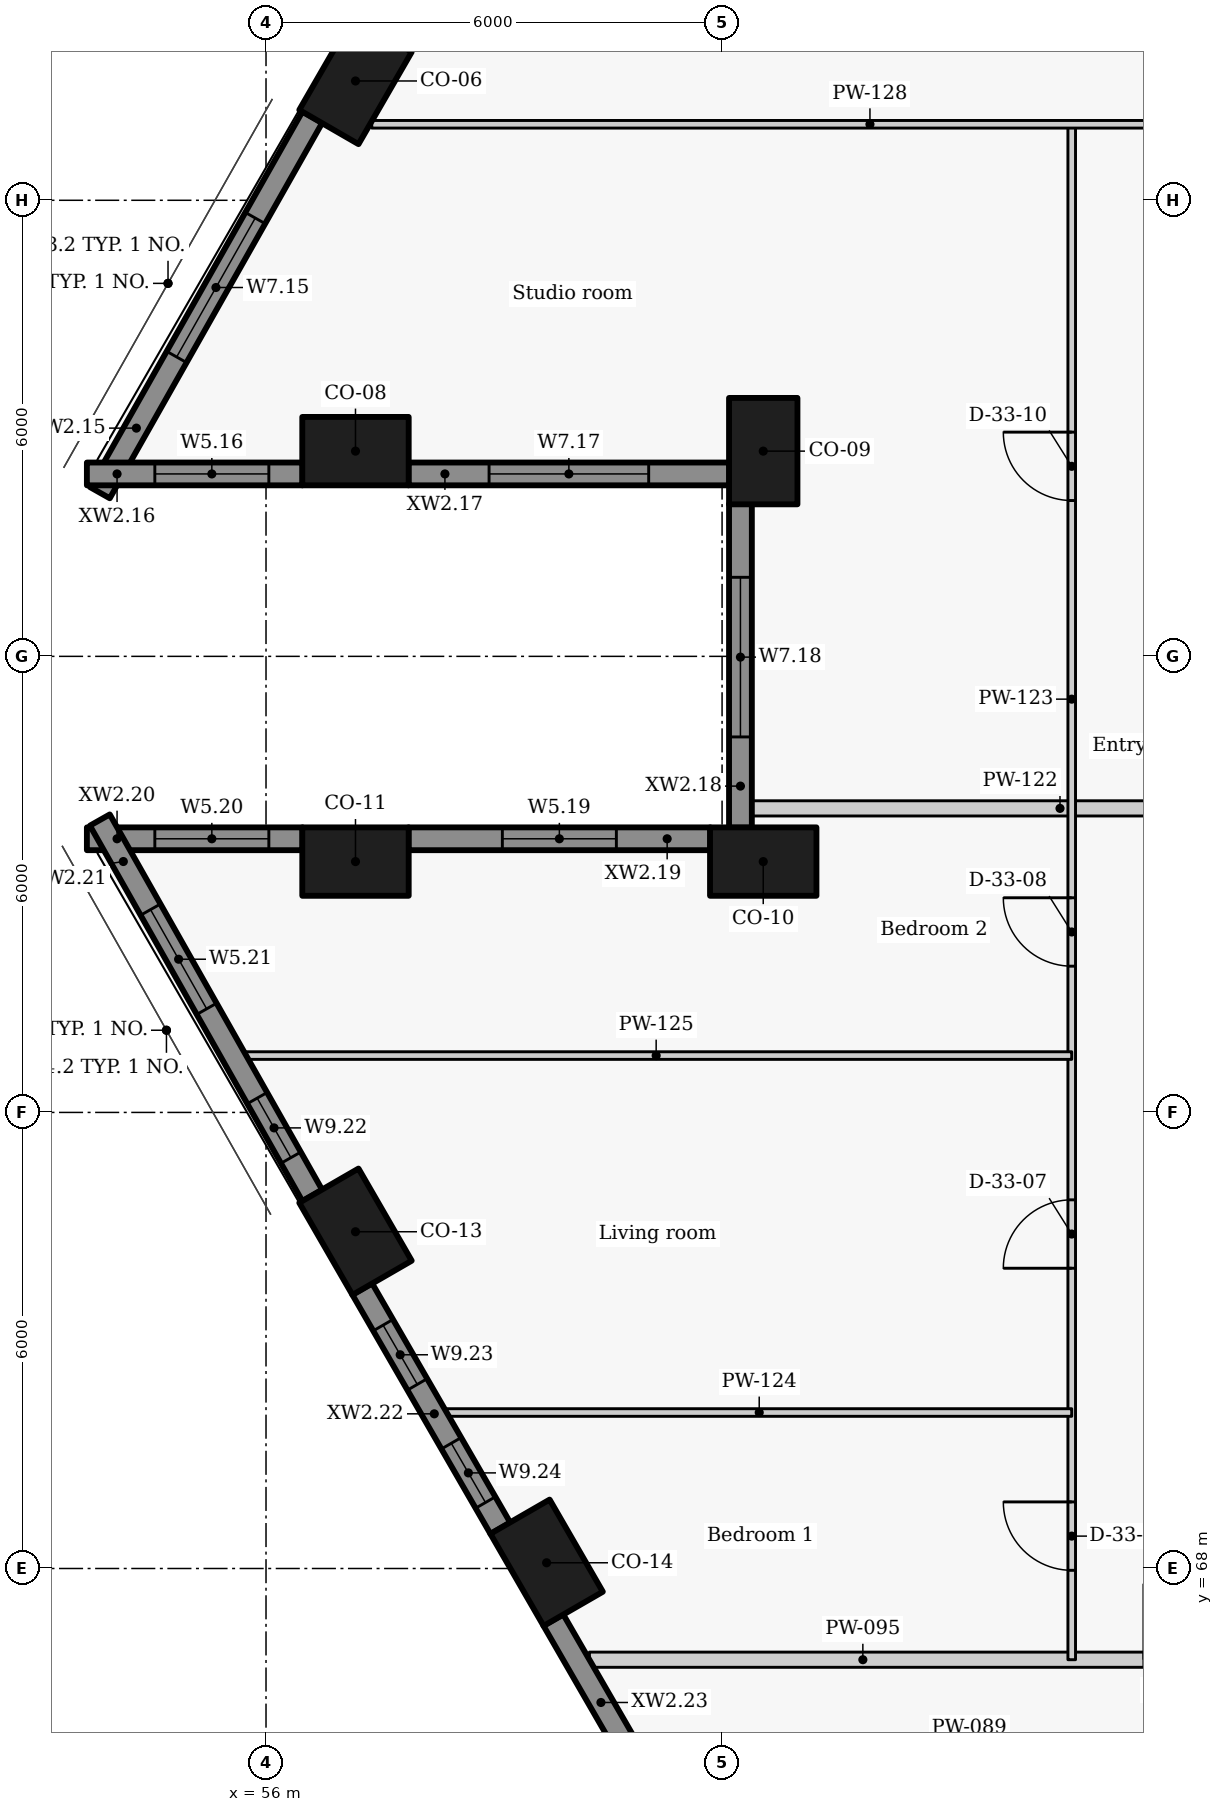
"""IFC4 building model, lengths in metres.
Left out: names, types, materials, properties, quantities, classifications, styles, units other than length and angle.
Written with IfcOpenShell. Run it as: python <this file> out.ifc"""

import sys

from ifc_helpers import new_model, si_unit, direction, frame, frame_2d, origin, origin_2d, place, context, subcontext, project, spatial, rectangle, extrude, element, fill, save


model = new_model("IFC4")
c1 = context("Model", 3, precision=1e-05, world=origin(), true_north=direction((0.0, 1.0)))
c2 = subcontext(c1, "Body", "Model", "MODEL_VIEW")
j1 = project(units=[si_unit("LENGTHUNIT", "METRE"), si_unit("PLANEANGLEUNIT", "RADIAN")], contexts=[c1])
p1 = place(None, origin())
s1 = spatial("IfcSite", under=j1, at=p1, CompositionType="ELEMENT")
p2 = place(p1, origin())
s2 = spatial("IfcBuilding", under=s1, at=p2, CompositionType="ELEMENT")
p3 = place(p2, frame((0.0, 0.0, 97.5)))
s3 = spatial("IfcBuildingStorey", under=s2, at=p3, CompositionType="ELEMENT", Elevation=97.5)
for number, where, z_axis, x_axis in (
    (1, (57.177, 87.57, 0.0), (0.0, 0.0, 1.0), (-0.5, -0.866, 0.0)),
    (2, (57.177, 82.7, 0.0), (0.0, 0.0, 1.0), (1.0, 0.0, 0.0)),
    (3, (62.542, 82.7, 0.0), (0.0, 0.0, 1.0), (0.0, -1.0, 0.0)),
    (4, (62.542, 77.3, 0.0), (0.0, 0.0, 1.0), (-1.0, 0.0, 0.0)),
    (5, (57.177, 77.3, 0.0), (0.0, 0.0, 1.0), (-1.0, 0.0, 0.0)),
    (6, (57.177, 72.43, 0.0), (0.0, 0.0, 1.0), (0.5, -0.866, 0.0)),
    (7, (59.692, 68.075, 0.0), (0.0, 0.0, 1.0), (0.5, -0.866, 0.0)),
):
    element("IfcColumn", number, at=place(p3, frame(where, z_axis=z_axis, x_axis=x_axis)), inside=s3, PredefinedType="COLUMN", context=c2, shape_type="SweptSolid", body=[
        extrude(rectangle(XDim=1.4, YDim=0.9, at=origin_2d()), origin(), (0.0, 0.0, 1.0), 3.3),
    ])
p4 = place(p3, frame((56.609, 87.094, 0.0), z_axis=(0.0, 0.0, 1.0), x_axis=(-0.492456858874, -0.870336855561, 0.0)))
e8 = element("IfcWall", 8, at=p4, inside=s3, PredefinedType="SOLIDWALL", context=c2, shape_type="SweptSolid", body=[
    extrude(rectangle(XDim=5.677, YDim=0.3, at=frame_2d((2.838, 0.0))), origin(), (0.0, 0.0, 1.0), 2.425),
])
p5 = place(p4, frame((1.525, 0.0, 0.9)))
e9 = element("IfcOpeningElement", 9, at=p5, cuts=e8, PredefinedType="OPENING", context=c2, shape_type="SweptSolid", body=[
    extrude(rectangle(XDim=2.1, YDim=1.1, at=frame_2d((1.05, 0.55))), frame((0.0, 0.16, 0.0), z_axis=(0.0, -1.0, 0.0), x_axis=(1.0, 0.0, 0.0)), (0.0, 0.0, 1.0), 0.32),
])
p6 = place(p3, frame((53.643, 82.4, 0.0), z_axis=(0.0, 0.0, 1.0), x_axis=(1.0, 0.0, 0.0)))
e10 = element("IfcWall", 10, at=p6, inside=s3, PredefinedType="SOLIDWALL", context=c2, shape_type="SweptSolid", body=[
    extrude(rectangle(XDim=2.838, YDim=0.3, at=frame_2d((1.419, 0.0))), origin(), (0.0, 0.0, 1.0), 2.425),
])
p7 = place(p6, frame((0.894, 0.0, 0.9)))
e11 = element("IfcOpeningElement", 11, at=p7, cuts=e10, PredefinedType="OPENING", context=c2, shape_type="SweptSolid", body=[
    extrude(rectangle(XDim=1.5, YDim=1.1, at=frame_2d((0.75, 0.55))), frame((0.0, 0.16, 0.0), z_axis=(0.0, -1.0, 0.0), x_axis=(1.0, 0.0, 0.0)), (0.0, 0.0, 1.0), 0.32),
])
p8 = place(p3, frame((57.873, 82.4, 0.0), z_axis=(0.0, 0.0, 1.0), x_axis=(1.0, 0.0, 0.0)))
e12 = element("IfcWall", 12, at=p8, inside=s3, PredefinedType="SOLIDWALL", context=c2, shape_type="SweptSolid", body=[
    extrude(rectangle(XDim=4.223, YDim=0.3, at=frame_2d((2.111, 0.0))), origin(), (0.0, 0.0, 1.0), 2.425),
])
p9 = place(p8, frame((1.061, 0.0, 0.9)))
e13 = element("IfcOpeningElement", 13, at=p9, cuts=e12, PredefinedType="OPENING", context=c2, shape_type="SweptSolid", body=[
    extrude(rectangle(XDim=2.1, YDim=1.1, at=frame_2d((1.05, 0.55))), frame((0.0, 0.16, 0.0), z_axis=(0.0, -1.0, 0.0), x_axis=(1.0, 0.0, 0.0)), (0.0, 0.0, 1.0), 0.32),
])
p10 = place(p3, frame((62.242, 82.004, 0.0), z_axis=(0.0, 0.0, 1.0), x_axis=(0.0, -1.0, 0.0)))
e14 = element("IfcWall", 14, at=p10, inside=s3, PredefinedType="SOLIDWALL", context=c2, shape_type="SweptSolid", body=[
    extrude(rectangle(XDim=4.258, YDim=0.3, at=frame_2d((2.129, 0.0))), origin(), (0.0, 0.0, 1.0), 2.425),
])
p11 = place(p10, frame((0.964, 0.0, 0.9)))
e15 = element("IfcOpeningElement", 15, at=p11, cuts=e14, PredefinedType="OPENING", context=c2, shape_type="SweptSolid", body=[
    extrude(rectangle(XDim=2.1, YDim=1.1, at=frame_2d((1.05, 0.55))), frame((0.0, 0.16, 0.0), z_axis=(0.0, -1.0, 0.0), x_axis=(1.0, 0.0, 0.0)), (0.0, 0.0, 1.0), 0.32),
])
p12 = place(p3, frame((61.846, 77.6, 0.0), z_axis=(0.0, 0.0, 1.0), x_axis=(-1.0, 0.0, 0.0)))
e16 = element("IfcWall", 16, at=p12, inside=s3, PredefinedType="SOLIDWALL", context=c2, shape_type="SweptSolid", body=[
    extrude(rectangle(XDim=3.973, YDim=0.3, at=frame_2d((1.986, 0.0))), origin(), (0.0, 0.0, 1.0), 2.425),
])
p13 = place(p12, frame((1.236, 0.0, 0.9)))
e17 = element("IfcOpeningElement", 17, at=p13, cuts=e16, PredefinedType="OPENING", context=c2, shape_type="SweptSolid", body=[
    extrude(rectangle(XDim=1.5, YDim=1.1, at=frame_2d((0.75, 0.55))), frame((0.0, 0.16, 0.0), z_axis=(0.0, -1.0, 0.0), x_axis=(1.0, 0.0, 0.0)), (0.0, 0.0, 1.0), 0.32),
])
p14 = place(p3, frame((56.481, 77.6, 0.0), z_axis=(0.0, 0.0, 1.0), x_axis=(-1.0, 0.0, 0.0)))
e18 = element("IfcWall", 18, at=p14, inside=s3, PredefinedType="SOLIDWALL", context=c2, shape_type="SweptSolid", body=[
    extrude(rectangle(XDim=2.838, YDim=0.3, at=frame_2d((1.419, 0.0))), origin(), (0.0, 0.0, 1.0), 2.425),
])
p15 = place(p14, frame((0.444, 0.0, 0.9)))
e19 = element("IfcOpeningElement", 19, at=p15, cuts=e18, PredefinedType="OPENING", context=c2, shape_type="SweptSolid", body=[
    extrude(rectangle(XDim=1.5, YDim=1.1, at=frame_2d((0.75, 0.55))), frame((0.0, 0.16, 0.0), z_axis=(0.0, -1.0, 0.0), x_axis=(1.0, 0.0, 0.0)), (0.0, 0.0, 1.0), 0.32),
])
p16 = place(p3, frame((53.814, 77.847, 0.0), z_axis=(0.0, 0.0, 1.0), x_axis=(0.492456858874, -0.870336855561, 0.0)))
e20 = element("IfcWall", 20, at=p16, inside=s3, PredefinedType="SOLIDWALL", context=c2, shape_type="SweptSolid", body=[
    extrude(rectangle(XDim=5.677, YDim=0.3, at=frame_2d((2.838, 0.0))), origin(), (0.0, 0.0, 1.0), 2.425),
])
p17 = place(p16, frame((1.354, 0.0, 0.9)))
e21 = element("IfcOpeningElement", 21, at=p17, cuts=e20, PredefinedType="OPENING", context=c2, shape_type="SweptSolid", body=[
    extrude(rectangle(XDim=1.5, YDim=1.1, at=frame_2d((0.75, 0.55))), frame((0.0, 0.16, 0.0), z_axis=(0.0, -1.0, 0.0), x_axis=(1.0, 0.0, 0.0)), (0.0, 0.0, 1.0), 0.32),
])
p18 = place(p16, frame((4.203, 0.0, 0.9)))
e22 = element("IfcOpeningElement", 22, at=p18, cuts=e20, PredefinedType="OPENING", context=c2, shape_type="SweptSolid", body=[
    extrude(rectangle(XDim=0.9, YDim=1.1, at=frame_2d((0.45, 0.55))), frame((0.0, 0.16, 0.0), z_axis=(0.0, -1.0, 0.0), x_axis=(1.0, 0.0, 0.0)), (0.0, 0.0, 1.0), 0.32),
])
p19 = place(p3, frame((57.265, 71.677, 0.0), z_axis=(0.0, 0.0, 1.0), x_axis=(0.500009139881, -0.866020126807, 0.0)))
e23 = element("IfcWall", 23, at=p19, inside=s3, PredefinedType="SOLIDWALL", context=c2, shape_type="SweptSolid", body=[
    extrude(rectangle(XDim=3.637, YDim=0.3, at=frame_2d((1.818, 0.0))), origin(), (0.0, 0.0, 1.0), 2.425),
])
p20 = place(p19, frame((0.55, 0.0, 0.9)))
e24 = element("IfcOpeningElement", 24, at=p20, cuts=e23, PredefinedType="OPENING", context=c2, shape_type="SweptSolid", body=[
    extrude(rectangle(XDim=0.9, YDim=1.1, at=frame_2d((0.45, 0.55))), frame((0.0, 0.16, 0.0), z_axis=(0.0, -1.0, 0.0), x_axis=(1.0, 0.0, 0.0)), (0.0, 0.0, 1.0), 0.32),
])
p21 = place(p19, frame((2.344, 0.0, 0.9)))
e25 = element("IfcOpeningElement", 25, at=p21, cuts=e23, PredefinedType="OPENING", context=c2, shape_type="SweptSolid", body=[
    extrude(rectangle(XDim=0.9, YDim=1.1, at=frame_2d((0.45, 0.55))), frame((0.0, 0.16, 0.0), z_axis=(0.0, -1.0, 0.0), x_axis=(1.0, 0.0, 0.0)), (0.0, 0.0, 1.0), 0.32),
])
p22 = place(p3, frame((59.78, 67.323, 0.0), z_axis=(0.0, 0.0, 1.0), x_axis=(0.499957037901, -0.866050206543, 0.0)))
e26 = element("IfcWall", 26, at=p22, inside=s3, PredefinedType="SOLIDWALL", context=c2, shape_type="SweptSolid", body=[
    extrude(rectangle(XDim=3.934, YDim=0.3, at=frame_2d((1.967, 0.0))), origin(), (0.0, 0.0, 1.0), 2.425),
])
p23 = place(p22, frame((2.606, 0.0, 0.9)))
e27 = element("IfcOpeningElement", 27, at=p23, cuts=e26, PredefinedType="OPENING", context=c2, shape_type="SweptSolid", body=[
    extrude(rectangle(XDim=0.9, YDim=1.1, at=frame_2d((0.45, 0.55))), frame((0.0, 0.16, 0.0), z_axis=(0.0, -1.0, 0.0), x_axis=(1.0, 0.0, 0.0)), (0.0, 0.0, 1.0), 0.32),
])
p24 = place(p3, frame((60.255, 66.8, 0.0), z_axis=(0.0, 0.0, 1.0), x_axis=(1.0, 0.0, 0.0)))
e28 = element("IfcWall", 28, at=p24, inside=s3, PredefinedType="PARTITIONING", context=c2, shape_type="SweptSolid", body=[
    extrude(rectangle(XDim=9.245, YDim=0.2, at=frame_2d((4.623, 0.0))), origin(), (0.0, 0.0, 1.0), 2.405),
])
p25 = place(p24, frame((7.295, 0.0, 0.0)))
e29 = element("IfcOpeningElement", 29, at=p25, cuts=e28, PredefinedType="OPENING", context=c2, shape_type="SweptSolid", body=[
    extrude(rectangle(XDim=1.0, YDim=2.1, at=frame_2d((0.5, 1.05))), frame((0.0, 0.11, 0.0), z_axis=(0.0, -1.0, 0.0), x_axis=(1.0, 0.0, 0.0)), (0.0, 0.0, 1.0), 0.22),
])
p26 = place(p3, frame((62.392, 78.0, 0.0), z_axis=(0.0, 0.0, 1.0), x_axis=(1.0, 0.0, 0.0)))
e30 = element("IfcWall", 30, at=p26, inside=s3, PredefinedType="PARTITIONING", context=c2, shape_type="SweptSolid", body=[
    extrude(rectangle(XDim=8.108, YDim=0.2, at=frame_2d((4.054, 0.0))), origin(), (0.0, 0.0, 1.0), 2.405),
])
p27 = place(p3, frame((66.6, 66.8, 0.0), z_axis=(0.0, 0.0, 1.0), x_axis=(0.0, 1.0, 0.0)))
e31 = element("IfcWall", 31, at=p27, inside=s3, PredefinedType="PARTITIONING", context=c2, shape_type="SweptSolid", body=[
    extrude(rectangle(XDim=20.2, YDim=0.1, at=frame_2d((10.1, 0.0))), origin(), (0.0, 0.0, 1.0), 3.025),
])
p28 = place(p27, frame((1.176, 0.0, 0.0)))
e32 = element("IfcOpeningElement", 32, at=p28, cuts=e31, PredefinedType="OPENING", context=c2, shape_type="SweptSolid", body=[
    extrude(rectangle(XDim=0.9, YDim=2.1, at=frame_2d((0.45, 1.05))), frame((0.0, 0.06, 0.0), z_axis=(0.0, -1.0, 0.0), x_axis=(1.0, 0.0, 0.0)), (0.0, 0.0, 1.0), 0.12),
])
p29 = place(p27, frame((5.15, 0.0, 0.0)))
e33 = element("IfcOpeningElement", 33, at=p29, cuts=e31, PredefinedType="OPENING", context=c2, shape_type="SweptSolid", body=[
    extrude(rectangle(XDim=0.9, YDim=2.1, at=frame_2d((0.45, 1.05))), frame((0.0, 0.06, 0.0), z_axis=(0.0, -1.0, 0.0), x_axis=(1.0, 0.0, 0.0)), (0.0, 0.0, 1.0), 0.12),
])
p30 = place(p27, frame((9.124, 0.0, 0.0)))
e34 = element("IfcOpeningElement", 34, at=p30, cuts=e31, PredefinedType="OPENING", context=c2, shape_type="SweptSolid", body=[
    extrude(rectangle(XDim=0.9, YDim=2.1, at=frame_2d((0.45, 1.05))), frame((0.0, 0.06, 0.0), z_axis=(0.0, -1.0, 0.0), x_axis=(1.0, 0.0, 0.0)), (0.0, 0.0, 1.0), 0.12),
])
p31 = place(p27, frame((15.25, 0.0, 0.0)))
e35 = element("IfcOpeningElement", 35, at=p31, cuts=e31, PredefinedType="OPENING", context=c2, shape_type="SweptSolid", body=[
    extrude(rectangle(XDim=0.9, YDim=2.1, at=frame_2d((0.45, 1.05))), frame((0.0, 0.06, 0.0), z_axis=(0.0, -1.0, 0.0), x_axis=(1.0, 0.0, 0.0)), (0.0, 0.0, 1.0), 0.12),
])
p32 = place(p3, frame((58.377, 70.052, 0.0), z_axis=(0.0, 0.0, 1.0), x_axis=(1.0, 0.0, 0.0)))
e36 = element("IfcWall", 36, at=p32, inside=s3, PredefinedType="PARTITIONING", context=c2, shape_type="SweptSolid", body=[
    extrude(rectangle(XDim=8.223, YDim=0.1, at=frame_2d((4.111, 0.0))), origin(), (0.0, 0.0, 1.0), 2.405),
])
p33 = place(p3, frame((55.666, 74.748, 0.0), z_axis=(0.0, 0.0, 1.0), x_axis=(1.0, 0.0, 0.0)))
e37 = element("IfcWall", 37, at=p33, inside=s3, PredefinedType="PARTITIONING", context=c2, shape_type="SweptSolid", body=[
    extrude(rectangle(XDim=10.935, YDim=0.1, at=frame_2d((5.467, 0.0))), origin(), (0.0, 0.0, 1.0), 2.405),
])
p34 = place(p3, frame((57.391, 87.0, 0.0), z_axis=(0.0, 0.0, 1.0), x_axis=(1.0, 0.0, 0.0)))
e38 = element("IfcWall", 38, at=p34, inside=s3, PredefinedType="PARTITIONING", context=c2, shape_type="SweptSolid", body=[
    extrude(rectangle(XDim=13.109, YDim=0.1, at=frame_2d((6.555, 0.0))), origin(), (0.0, 0.0, 1.0), 2.505),
])
p35 = place(p5, origin())
e39 = element("IfcWindow", 39, at=p35, inside=s3, PartitioningType="SINGLE_PANEL", PredefinedType="WINDOW", context=c2, shape_type="SweptSolid", body=[
    extrude(rectangle(XDim=2.1, YDim=1.1, at=frame_2d((1.05, 0.55))), frame((0.0, 0.03, 0.0), z_axis=(0.0, -1.0, 0.0), x_axis=(1.0, 0.0, 0.0)), (0.0, 0.0, 1.0), 0.06),
])
fill(e9, e39)
p36 = place(p7, origin())
e40 = element("IfcWindow", 40, at=p36, inside=s3, PartitioningType="SINGLE_PANEL", PredefinedType="WINDOW", context=c2, shape_type="SweptSolid", body=[
    extrude(rectangle(XDim=1.5, YDim=1.1, at=frame_2d((0.75, 0.55))), frame((0.0, 0.03, 0.0), z_axis=(0.0, -1.0, 0.0), x_axis=(1.0, 0.0, 0.0)), (0.0, 0.0, 1.0), 0.06),
])
fill(e11, e40)
p37 = place(p9, origin())
e41 = element("IfcWindow", 41, at=p37, inside=s3, PartitioningType="SINGLE_PANEL", PredefinedType="WINDOW", context=c2, shape_type="SweptSolid", body=[
    extrude(rectangle(XDim=2.1, YDim=1.1, at=frame_2d((1.05, 0.55))), frame((0.0, 0.03, 0.0), z_axis=(0.0, -1.0, 0.0), x_axis=(1.0, 0.0, 0.0)), (0.0, 0.0, 1.0), 0.06),
])
fill(e13, e41)
p38 = place(p11, origin())
e42 = element("IfcWindow", 42, at=p38, inside=s3, PartitioningType="SINGLE_PANEL", PredefinedType="WINDOW", context=c2, shape_type="SweptSolid", body=[
    extrude(rectangle(XDim=2.1, YDim=1.1, at=frame_2d((1.05, 0.55))), frame((0.0, 0.03, 0.0), z_axis=(0.0, -1.0, 0.0), x_axis=(1.0, 0.0, 0.0)), (0.0, 0.0, 1.0), 0.06),
])
fill(e15, e42)
p39 = place(p13, origin())
e43 = element("IfcWindow", 43, at=p39, inside=s3, PartitioningType="SINGLE_PANEL", PredefinedType="WINDOW", context=c2, shape_type="SweptSolid", body=[
    extrude(rectangle(XDim=1.5, YDim=1.1, at=frame_2d((0.75, 0.55))), frame((0.0, 0.03, 0.0), z_axis=(0.0, -1.0, 0.0), x_axis=(1.0, 0.0, 0.0)), (0.0, 0.0, 1.0), 0.06),
])
fill(e17, e43)
p40 = place(p15, origin())
e44 = element("IfcWindow", 44, at=p40, inside=s3, PartitioningType="SINGLE_PANEL", PredefinedType="WINDOW", context=c2, shape_type="SweptSolid", body=[
    extrude(rectangle(XDim=1.5, YDim=1.1, at=frame_2d((0.75, 0.55))), frame((0.0, 0.03, 0.0), z_axis=(0.0, -1.0, 0.0), x_axis=(1.0, 0.0, 0.0)), (0.0, 0.0, 1.0), 0.06),
])
fill(e19, e44)
p41 = place(p17, origin())
e45 = element("IfcWindow", 45, at=p41, inside=s3, PartitioningType="SINGLE_PANEL", PredefinedType="WINDOW", context=c2, shape_type="SweptSolid", body=[
    extrude(rectangle(XDim=1.5, YDim=1.1, at=frame_2d((0.75, 0.55))), frame((0.0, 0.03, 0.0), z_axis=(0.0, -1.0, 0.0), x_axis=(1.0, 0.0, 0.0)), (0.0, 0.0, 1.0), 0.06),
])
fill(e21, e45)
p42 = place(p18, origin())
e46 = element("IfcWindow", 46, at=p42, inside=s3, PartitioningType="SINGLE_PANEL", PredefinedType="WINDOW", context=c2, shape_type="SweptSolid", body=[
    extrude(rectangle(XDim=0.9, YDim=1.1, at=frame_2d((0.45, 0.55))), frame((0.0, 0.03, 0.0), z_axis=(0.0, -1.0, 0.0), x_axis=(1.0, 0.0, 0.0)), (0.0, 0.0, 1.0), 0.06),
])
fill(e22, e46)
p43 = place(p20, origin())
e47 = element("IfcWindow", 47, at=p43, inside=s3, PartitioningType="SINGLE_PANEL", PredefinedType="WINDOW", context=c2, shape_type="SweptSolid", body=[
    extrude(rectangle(XDim=0.9, YDim=1.1, at=frame_2d((0.45, 0.55))), frame((0.0, 0.03, 0.0), z_axis=(0.0, -1.0, 0.0), x_axis=(1.0, 0.0, 0.0)), (0.0, 0.0, 1.0), 0.06),
])
fill(e24, e47)
p44 = place(p21, origin())
e48 = element("IfcWindow", 48, at=p44, inside=s3, PartitioningType="SINGLE_PANEL", PredefinedType="WINDOW", context=c2, shape_type="SweptSolid", body=[
    extrude(rectangle(XDim=0.9, YDim=1.1, at=frame_2d((0.45, 0.55))), frame((0.0, 0.03, 0.0), z_axis=(0.0, -1.0, 0.0), x_axis=(1.0, 0.0, 0.0)), (0.0, 0.0, 1.0), 0.06),
])
fill(e25, e48)
p45 = place(p25, origin())
e49 = element("IfcDoor", 49, at=p45, inside=s3, OperationType="SINGLE_SWING_LEFT", PredefinedType="DOOR", context=c2, shape_type="SweptSolid", body=[
    extrude(rectangle(XDim=1.0, YDim=2.1, at=frame_2d((0.5, 1.05))), frame((0.0, 0.025, 0.0), z_axis=(0.0, -1.0, 0.0), x_axis=(1.0, 0.0, 0.0)), (0.0, 0.0, 1.0), 0.05),
])
fill(e29, e49)
p46 = place(p28, origin())
e50 = element("IfcDoor", 50, at=p46, inside=s3, OperationType="SINGLE_SWING_RIGHT", PredefinedType="DOOR", context=c2, shape_type="SweptSolid", body=[
    extrude(rectangle(XDim=0.9, YDim=2.1, at=frame_2d((0.45, 1.05))), frame((0.0, 0.025, 0.0), z_axis=(0.0, -1.0, 0.0), x_axis=(1.0, 0.0, 0.0)), (0.0, 0.0, 1.0), 0.05),
])
fill(e32, e50)
p47 = place(p29, origin())
e51 = element("IfcDoor", 51, at=p47, inside=s3, OperationType="SINGLE_SWING_LEFT", PredefinedType="DOOR", context=c2, shape_type="SweptSolid", body=[
    extrude(rectangle(XDim=0.9, YDim=2.1, at=frame_2d((0.45, 1.05))), frame((0.0, 0.025, 0.0), z_axis=(0.0, -1.0, 0.0), x_axis=(1.0, 0.0, 0.0)), (0.0, 0.0, 1.0), 0.05),
])
fill(e33, e51)
p48 = place(p30, origin())
e52 = element("IfcDoor", 52, at=p48, inside=s3, OperationType="SINGLE_SWING_RIGHT", PredefinedType="DOOR", context=c2, shape_type="SweptSolid", body=[
    extrude(rectangle(XDim=0.9, YDim=2.1, at=frame_2d((0.45, 1.05))), frame((0.0, 0.025, 0.0), z_axis=(0.0, -1.0, 0.0), x_axis=(1.0, 0.0, 0.0)), (0.0, 0.0, 1.0), 0.05),
])
fill(e34, e52)
p49 = place(p31, origin())
e53 = element("IfcDoor", 53, at=p49, inside=s3, OperationType="SINGLE_SWING_RIGHT", PredefinedType="DOOR", context=c2, shape_type="SweptSolid", body=[
    extrude(rectangle(XDim=0.9, YDim=2.1, at=frame_2d((0.45, 1.05))), frame((0.0, 0.025, 0.0), z_axis=(0.0, -1.0, 0.0), x_axis=(1.0, 0.0, 0.0)), (0.0, 0.0, 1.0), 0.05),
])
fill(e35, e53)
save(model, sys.argv[1])
